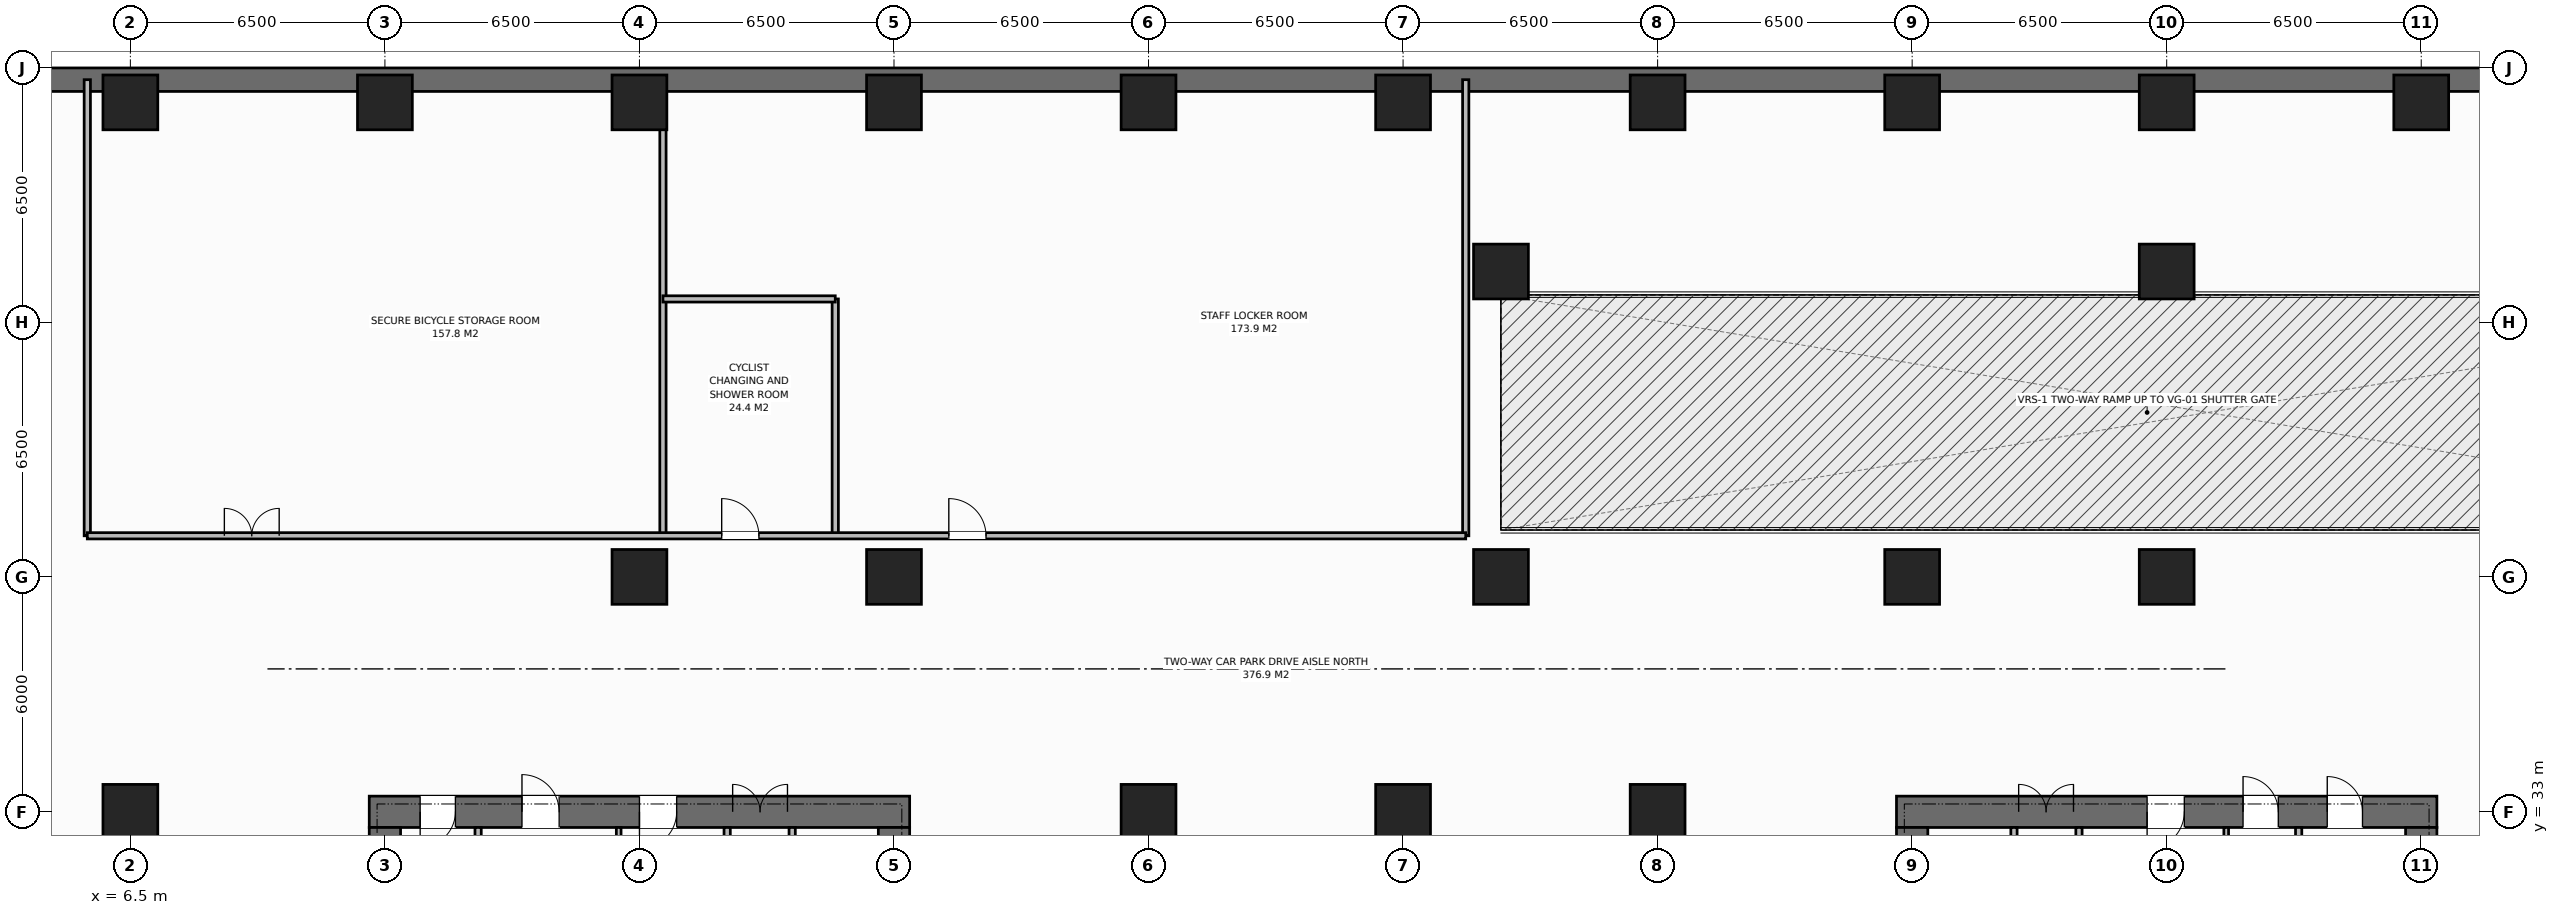
"""IFC4 building model, lengths in metres.
Left out: names, types, materials, properties, quantities, classifications, styles, units other than length and angle.
Written with IfcOpenShell. Run it as: python <this file> out.ifc"""

import sys

from ifc_helpers import new_model, si_unit, direction, frame, frame_2d, origin, origin_2d, place, context, subcontext, project, spatial, rectangle, extrude, element, fill, save


model = new_model("IFC4")
c1 = context("Model", 3, precision=1e-05, world=origin(), true_north=direction((0.0, 1.0)))
c2 = subcontext(c1, "Body", "Model", "MODEL_VIEW")
j1 = project(units=[si_unit("LENGTHUNIT", "METRE"), si_unit("PLANEANGLEUNIT", "RADIAN")], contexts=[c1])
p1 = place(None, origin())
s1 = spatial("IfcSite", under=j1, at=p1, CompositionType="ELEMENT")
p2 = place(p1, origin())
s2 = spatial("IfcBuilding", under=s1, at=p2, CompositionType="ELEMENT")
p3 = place(p2, frame((0.0, 0.0, -4.5)))
s3 = spatial("IfcBuildingStorey", under=s2, at=p3, CompositionType="ELEMENT", Elevation=-4.5)
p4 = place(p3, frame((78.2, 51.7, 0.0), z_axis=(0.0, 0.0, 1.0), x_axis=(-1.0, 0.0, 0.0)))
e1 = element("IfcWall", 1, at=p4, inside=s3, PredefinedType="USERDEFINED", context=c2, shape_type="SweptSolid", body=[
    extrude(rectangle(XDim=78.4, YDim=0.6, at=frame_2d((39.2, 0.0))), origin(), (0.0, 0.0, 1.0), 4.22),
])
p5 = place(p3, frame((12.6, 33.0, 0.0), z_axis=(0.0, 0.0, 1.0), x_axis=(1.0, 0.0, 0.0)))
e2 = element("IfcWall", 2, at=p5, inside=s3, PredefinedType="SHEAR", context=c2, shape_type="SweptSolid", body=[
    extrude(rectangle(XDim=13.8, YDim=0.8, at=frame_2d((6.9, 0.0))), origin(), (0.0, 0.0, 1.0), 4.5),
])
p6 = place(p5, frame((1.3, 0.0, 0.0)))
e3 = element("IfcOpeningElement", 3, at=p6, cuts=e2, PredefinedType="OPENING", context=c2, shape_type="SweptSolid", body=[
    extrude(rectangle(XDim=0.9, YDim=2.15, at=frame_2d((0.45, 1.075))), frame((0.0, 0.41, 0.0), z_axis=(0.0, -1.0, 0.0), x_axis=(1.0, 0.0, 0.0)), (0.0, 0.0, 1.0), 0.82),
])
p7 = place(p5, frame((3.9, 0.0, 0.0)))
e4 = element("IfcOpeningElement", 4, at=p7, cuts=e2, PredefinedType="OPENING", context=c2, shape_type="SweptSolid", body=[
    extrude(rectangle(XDim=0.95, YDim=2.15, at=frame_2d((0.475, 1.075))), frame((0.0, 0.41, 0.0), z_axis=(0.0, -1.0, 0.0), x_axis=(1.0, 0.0, 0.0)), (0.0, 0.0, 1.0), 0.82),
])
p8 = place(p5, frame((6.9, 0.0, 0.0)))
e5 = element("IfcOpeningElement", 5, at=p8, cuts=e2, PredefinedType="OPENING", context=c2, shape_type="SweptSolid", body=[
    extrude(rectangle(XDim=0.95, YDim=2.15, at=frame_2d((0.475, 1.075))), frame((0.0, 0.41, 0.0), z_axis=(0.0, -1.0, 0.0), x_axis=(1.0, 0.0, 0.0)), (0.0, 0.0, 1.0), 0.82),
])
p9 = place(p5, frame((9.28, 0.0, 0.0)))
e6 = element("IfcOpeningElement", 6, at=p9, cuts=e2, PredefinedType="OPENING", context=c2, shape_type="SweptSolid", body=[
    extrude(rectangle(XDim=1.4, YDim=2.2, at=frame_2d((0.7, 1.1))), frame((0.0, 0.41, 0.0), z_axis=(0.0, -1.0, 0.0), x_axis=(1.0, 0.0, 0.0)), (0.0, 0.0, 1.0), 0.82),
])
p10 = place(p3, frame((13.0, 19.4, 0.0), z_axis=(0.0, 0.0, 1.0), x_axis=(0.0, 1.0, 0.0)))
e7 = element("IfcWall", 7, at=p10, inside=s3, PredefinedType="SHEAR", context=c2, shape_type="SweptSolid", body=[
    extrude(rectangle(XDim=13.2, YDim=0.8, at=frame_2d((6.6, 0.0))), origin(), (0.0, 0.0, 1.0), 4.5),
])
p11 = place(p10, frame((4.65, 0.0, 0.0)))
e8 = element("IfcOpeningElement", 8, at=p11, cuts=e7, PredefinedType="OPENING", context=c2, shape_type="SweptSolid", body=[
    extrude(rectangle(XDim=1.4, YDim=2.2, at=frame_2d((0.7, 1.1))), frame((0.0, 0.41, 0.0), z_axis=(0.0, -1.0, 0.0), x_axis=(1.0, 0.0, 0.0)), (0.0, 0.0, 1.0), 0.82),
])
p12 = place(p3, frame((26.0, 19.4, 0.0), z_axis=(0.0, 0.0, 1.0), x_axis=(0.0, 1.0, 0.0)))
e9 = element("IfcWall", 9, at=p12, inside=s3, PredefinedType="SHEAR", context=c2, shape_type="SweptSolid", body=[
    extrude(rectangle(XDim=13.2, YDim=0.8, at=frame_2d((6.6, 0.0))), origin(), (0.0, 0.0, 1.0), 4.5),
])
p13 = place(p3, frame((51.6, 33.0, 0.0), z_axis=(0.0, 0.0, 1.0), x_axis=(1.0, 0.0, 0.0)))
e10 = element("IfcWall", 10, at=p13, inside=s3, PredefinedType="SHEAR", context=c2, shape_type="SweptSolid", body=[
    extrude(rectangle(XDim=13.8, YDim=0.8, at=frame_2d((6.9, 0.0))), origin(), (0.0, 0.0, 1.0), 4.5),
])
p14 = place(p13, frame((3.12, 0.0, 0.0)))
e11 = element("IfcOpeningElement", 11, at=p14, cuts=e10, PredefinedType="OPENING", context=c2, shape_type="SweptSolid", body=[
    extrude(rectangle(XDim=1.4, YDim=2.2, at=frame_2d((0.7, 1.1))), frame((0.0, 0.41, 0.0), z_axis=(0.0, -1.0, 0.0), x_axis=(1.0, 0.0, 0.0)), (0.0, 0.0, 1.0), 0.82),
])
p15 = place(p13, frame((11.0, 0.0, 0.0)))
e12 = element("IfcOpeningElement", 12, at=p15, cuts=e10, PredefinedType="OPENING", context=c2, shape_type="SweptSolid", body=[
    extrude(rectangle(XDim=0.9, YDim=2.15, at=frame_2d((0.45, 1.075))), frame((0.0, 0.41, 0.0), z_axis=(0.0, -1.0, 0.0), x_axis=(1.0, 0.0, 0.0)), (0.0, 0.0, 1.0), 0.82),
])
p16 = place(p13, frame((6.4, 0.0, 0.0)))
e13 = element("IfcOpeningElement", 13, at=p16, cuts=e10, PredefinedType="OPENING", context=c2, shape_type="SweptSolid", body=[
    extrude(rectangle(XDim=0.95, YDim=2.15, at=frame_2d((0.475, 1.075))), frame((0.0, 0.41, 0.0), z_axis=(0.0, -1.0, 0.0), x_axis=(1.0, 0.0, 0.0)), (0.0, 0.0, 1.0), 0.82),
])
p17 = place(p13, frame((8.85, 0.0, 0.0)))
e14 = element("IfcOpeningElement", 14, at=p17, cuts=e10, PredefinedType="OPENING", context=c2, shape_type="SweptSolid", body=[
    extrude(rectangle(XDim=0.9, YDim=2.15, at=frame_2d((0.45, 1.075))), frame((0.0, 0.41, 0.0), z_axis=(0.0, -1.0, 0.0), x_axis=(1.0, 0.0, 0.0)), (0.0, 0.0, 1.0), 0.82),
])
p18 = place(p3, frame((52.0, 19.4, 0.0), z_axis=(0.0, 0.0, 1.0), x_axis=(0.0, 1.0, 0.0)))
e15 = element("IfcWall", 15, at=p18, inside=s3, PredefinedType="SHEAR", context=c2, shape_type="SweptSolid", body=[
    extrude(rectangle(XDim=13.2, YDim=0.8, at=frame_2d((6.6, 0.0))), origin(), (0.0, 0.0, 1.0), 4.5),
])
p19 = place(p3, frame((65.0, 19.4, 0.0), z_axis=(0.0, 0.0, 1.0), x_axis=(0.0, 1.0, 0.0)))
e16 = element("IfcWall", 16, at=p19, inside=s3, PredefinedType="SHEAR", context=c2, shape_type="SweptSolid", body=[
    extrude(rectangle(XDim=13.2, YDim=0.8, at=frame_2d((6.6, 0.0))), origin(), (0.0, 0.0, 1.0), 4.5),
])
p20 = place(p19, frame((8.05, 0.0, 0.0)))
e17 = element("IfcOpeningElement", 17, at=p20, cuts=e16, PredefinedType="OPENING", context=c2, shape_type="SweptSolid", body=[
    extrude(rectangle(XDim=1.3, YDim=2.2, at=frame_2d((0.65, 1.1))), frame((0.0, 0.41, 0.0), z_axis=(0.0, -1.0, 0.0), x_axis=(1.0, 0.0, 0.0)), (0.0, 0.0, 1.0), 0.82),
])
for number, where, z_axis, x_axis in (
    (18, (19.5, 39.0, 0.0), (0.0, 0.0, 1.0), (1.0, 0.0, 0.0)),
    (19, (58.5, 39.0, 0.0), (0.0, 0.0, 1.0), (1.0, 0.0, 0.0)),
    (20, (6.5, 33.0, 0.0), (0.0, 0.0, 1.0), (1.0, 0.0, 0.0)),
    (21, (32.5, 33.0, 0.0), (0.0, 0.0, 1.0), (1.0, 0.0, 0.0)),
    (22, (39.0, 33.0, 0.0), (0.0, 0.0, 1.0), (1.0, 0.0, 0.0)),
    (23, (45.5, 33.0, 0.0), (0.0, 0.0, 1.0), (1.0, 0.0, 0.0)),
    (24, (41.5, 39.0, 0.0), (0.0, 0.0, 1.0), (1.0, 0.0, 0.0)),
    (25, (41.5, 46.8, 0.0), (0.0, 0.0, 1.0), (1.0, 0.0, 0.0)),
    (26, (58.5, 46.8, 0.0), (0.0, 0.0, 1.0), (1.0, 0.0, 0.0)),
    (27, (26.0, 39.0, 0.0), (0.0, 0.0, 1.0), (1.0, 0.0, 0.0)),
    (28, (52.0, 39.0, 0.0), (0.0, 0.0, 1.0), (1.0, 0.0, 0.0)),
    (29, (6.5, 51.12, 0.0), (0.0, 0.0, 1.0), (1.0, 0.0, 0.0)),
    (30, (13.0, 51.12, 0.0), (0.0, 0.0, 1.0), (1.0, 0.0, 0.0)),
    (31, (19.5, 51.12, 0.0), (0.0, 0.0, 1.0), (1.0, 0.0, 0.0)),
    (32, (26.0, 51.12, 0.0), (0.0, 0.0, 1.0), (1.0, 0.0, 0.0)),
    (33, (32.5, 51.12, 0.0), (0.0, 0.0, 1.0), (1.0, 0.0, 0.0)),
    (34, (39.0, 51.12, 0.0), (0.0, 0.0, 1.0), (1.0, 0.0, 0.0)),
    (35, (45.5, 51.12, 0.0), (0.0, 0.0, 1.0), (1.0, 0.0, 0.0)),
    (36, (52.0, 51.12, 0.0), (0.0, 0.0, 1.0), (1.0, 0.0, 0.0)),
    (37, (58.5, 51.12, 0.0), (0.0, 0.0, 1.0), (1.0, 0.0, 0.0)),
    (38, (65.0, 51.12, 0.0), (0.0, 0.0, 1.0), (1.0, 0.0, 0.0)),
):
    element("IfcColumn", number, at=place(p3, frame(where, z_axis=z_axis, x_axis=x_axis)), inside=s3, PredefinedType="COLUMN", context=c2, shape_type="SweptSolid", body=[
        extrude(rectangle(XDim=1.4, YDim=1.4, at=origin_2d()), origin(), (0.0, 0.0, 1.0), 4.5),
    ])
p21 = place(p3, frame((15.38, 26.56, 0.0), z_axis=(0.0, 0.0, 1.0), x_axis=(0.0, 1.0, 0.0)))
e39 = element("IfcWall", 39, at=p21, inside=s3, PredefinedType="STANDARD", context=c2, shape_type="SweptSolid", body=[
    extrude(rectangle(XDim=6.04, YDim=0.16, at=frame_2d((3.02, 0.0))), origin(), (0.0, 0.0, 1.0), 4.22),
])
p22 = place(p3, frame((18.97, 26.56, 0.0), z_axis=(0.0, 0.0, 1.0), x_axis=(0.0, 1.0, 0.0)))
e40 = element("IfcWall", 40, at=p22, inside=s3, PredefinedType="PARTITIONING", context=c2, shape_type="SweptSolid", body=[
    extrude(rectangle(XDim=6.04, YDim=0.12, at=frame_2d((3.02, 0.0))), origin(), (0.0, 0.0, 1.0), 4.22),
])
p23 = place(p3, frame((21.74, 26.56, 0.0), z_axis=(0.0, 0.0, 1.0), x_axis=(0.0, 1.0, 0.0)))
e41 = element("IfcWall", 41, at=p23, inside=s3, PredefinedType="STANDARD", context=c2, shape_type="SweptSolid", body=[
    extrude(rectangle(XDim=6.04, YDim=0.16, at=frame_2d((3.02, 0.0))), origin(), (0.0, 0.0, 1.0), 4.22),
])
p24 = place(p3, frame((23.4, 19.4, 0.0), z_axis=(0.0, 0.0, 1.0), x_axis=(0.0, 1.0, 0.0)))
e42 = element("IfcWall", 42, at=p24, inside=s3, PredefinedType="STANDARD", context=c2, shape_type="SweptSolid", body=[
    extrude(rectangle(XDim=13.2, YDim=0.16, at=frame_2d((6.6, 0.0))), origin(), (0.0, 0.0, 1.0), 4.22),
])
p25 = place(p24, frame((1.2, 0.0, 0.0)))
e43 = element("IfcOpeningElement", 43, at=p25, cuts=e42, PredefinedType="OPENING", context=c2, shape_type="SweptSolid", body=[
    extrude(rectangle(XDim=0.95, YDim=2.15, at=frame_2d((0.475, 1.075))), frame((0.0, 0.09, 0.0), z_axis=(0.0, -1.0, 0.0), x_axis=(1.0, 0.0, 0.0)), (0.0, 0.0, 1.0), 0.18),
])
p26 = place(p3, frame((54.6, 19.4, 0.0), z_axis=(0.0, 0.0, 1.0), x_axis=(0.0, 1.0, 0.0)))
e44 = element("IfcWall", 44, at=p26, inside=s3, PredefinedType="STANDARD", context=c2, shape_type="SweptSolid", body=[
    extrude(rectangle(XDim=13.2, YDim=0.16, at=frame_2d((6.6, 0.0))), origin(), (0.0, 0.0, 1.0), 4.22),
])
p27 = place(p26, frame((1.2, 0.0, 0.0)))
e45 = element("IfcOpeningElement", 45, at=p27, cuts=e44, PredefinedType="OPENING", context=c2, shape_type="SweptSolid", body=[
    extrude(rectangle(XDim=0.95, YDim=2.15, at=frame_2d((0.475, 1.075))), frame((0.0, 0.09, 0.0), z_axis=(0.0, -1.0, 0.0), x_axis=(1.0, 0.0, 0.0)), (0.0, 0.0, 1.0), 0.18),
])
p28 = place(p3, frame((56.26, 23.09, 0.0), z_axis=(0.0, 0.0, 1.0), x_axis=(0.0, 1.0, 0.0)))
e46 = element("IfcWall", 46, at=p28, inside=s3, PredefinedType="STANDARD", context=c2, shape_type="SweptSolid", body=[
    extrude(rectangle(XDim=9.51, YDim=0.16, at=frame_2d((4.755, 0.0))), origin(), (0.0, 0.0, 1.0), 4.22),
])
p29 = place(p28, frame((1.01, 0.0, 0.0)))
e47 = element("IfcOpeningElement", 47, at=p29, cuts=e46, PredefinedType="OPENING", context=c2, shape_type="SweptSolid", body=[
    extrude(rectangle(XDim=1.3, YDim=2.2, at=frame_2d((0.65, 1.1))), frame((0.0, 0.09, 0.0), z_axis=(0.0, -1.0, 0.0), x_axis=(1.0, 0.0, 0.0)), (0.0, 0.0, 1.0), 0.18),
])
p30 = place(p3, frame((61.87, 26.56, 0.0), z_axis=(0.0, 0.0, 1.0), x_axis=(0.0, 1.0, 0.0)))
e48 = element("IfcWall", 48, at=p30, inside=s3, PredefinedType="STANDARD", context=c2, shape_type="SweptSolid", body=[
    extrude(rectangle(XDim=6.04, YDim=0.16, at=frame_2d((3.02, 0.0))), origin(), (0.0, 0.0, 1.0), 4.22),
])
p31 = place(p3, frame((60.02, 26.56, 0.0), z_axis=(0.0, 0.0, 1.0), x_axis=(0.0, 1.0, 0.0)))
e49 = element("IfcWall", 49, at=p31, inside=s3, PredefinedType="PARTITIONING", context=c2, shape_type="SweptSolid", body=[
    extrude(rectangle(XDim=6.04, YDim=0.12, at=frame_2d((3.02, 0.0))), origin(), (0.0, 0.0, 1.0), 4.22),
])
for number, where, z_axis, x_axis in (
    (50, (5.4, 40.05, 0.0), (0.0, 0.0, 1.0), (0.0, 1.0, 0.0)),
    (51, (20.1, 40.05, 0.0), (0.0, 0.0, 1.0), (0.0, 1.0, 0.0)),
):
    element("IfcWall", number, at=place(p3, frame(where, z_axis=z_axis, x_axis=x_axis)), inside=s3, PredefinedType="STANDARD", context=c2, shape_type="SweptSolid", body=[
        extrude(rectangle(XDim=11.65, YDim=0.16, at=frame_2d((5.825, 0.0))), origin(), (0.0, 0.0, 1.0), 4.22),
    ])
p32 = place(p3, frame((24.5, 40.05, 0.0), z_axis=(0.0, 0.0, 1.0), x_axis=(0.0, 1.0, 0.0)))
e52 = element("IfcWall", 52, at=p32, inside=s3, PredefinedType="STANDARD", context=c2, shape_type="SweptSolid", body=[
    extrude(rectangle(XDim=6.05, YDim=0.16, at=frame_2d((3.025, 0.0))), origin(), (0.0, 0.0, 1.0), 4.22),
])
p33 = place(p3, frame((20.1, 46.1, 0.0), z_axis=(0.0, 0.0, 1.0), x_axis=(1.0, 0.0, 0.0)))
e53 = element("IfcWall", 53, at=p33, inside=s3, PredefinedType="STANDARD", context=c2, shape_type="SweptSolid", body=[
    extrude(rectangle(XDim=4.4, YDim=0.16, at=frame_2d((2.2, 0.0))), origin(), (0.0, 0.0, 1.0), 4.22),
])
p34 = place(p3, frame((40.6, 40.05, 0.0), z_axis=(0.0, 0.0, 1.0), x_axis=(0.0, 1.0, 0.0)))
e54 = element("IfcWall", 54, at=p34, inside=s3, PredefinedType="STANDARD", context=c2, shape_type="SweptSolid", body=[
    extrude(rectangle(XDim=11.65, YDim=0.16, at=frame_2d((5.825, 0.0))), origin(), (0.0, 0.0, 1.0), 4.22),
])
p35 = place(p3, frame((5.4, 40.05, 0.0), z_axis=(0.0, 0.0, 1.0), x_axis=(1.0, 0.0, 0.0)))
e55 = element("IfcWall", 55, at=p35, inside=s3, PredefinedType="STANDARD", context=c2, shape_type="SweptSolid", body=[
    extrude(rectangle(XDim=35.2, YDim=0.16, at=frame_2d((17.6, 0.0))), origin(), (0.0, 0.0, 1.0), 4.22),
])
p36 = place(p35, frame((3.5, 0.0, 0.0)))
e56 = element("IfcOpeningElement", 56, at=p36, cuts=e55, PredefinedType="OPENING", context=c2, shape_type="SweptSolid", body=[
    extrude(rectangle(XDim=1.4, YDim=2.2, at=frame_2d((0.7, 1.1))), frame((0.0, 0.09, 0.0), z_axis=(0.0, -1.0, 0.0), x_axis=(1.0, 0.0, 0.0)), (0.0, 0.0, 1.0), 0.18),
])
p37 = place(p35, frame((16.2, 0.0, 0.0)))
e57 = element("IfcOpeningElement", 57, at=p37, cuts=e55, PredefinedType="OPENING", context=c2, shape_type="SweptSolid", body=[
    extrude(rectangle(XDim=0.95, YDim=2.15, at=frame_2d((0.475, 1.075))), frame((0.0, 0.09, 0.0), z_axis=(0.0, -1.0, 0.0), x_axis=(1.0, 0.0, 0.0)), (0.0, 0.0, 1.0), 0.18),
])
p38 = place(p35, frame((22.0, 0.0, 0.0)))
e58 = element("IfcOpeningElement", 58, at=p38, cuts=e55, PredefinedType="OPENING", context=c2, shape_type="SweptSolid", body=[
    extrude(rectangle(XDim=0.95, YDim=2.15, at=frame_2d((0.475, 1.075))), frame((0.0, 0.09, 0.0), z_axis=(0.0, -1.0, 0.0), x_axis=(1.0, 0.0, 0.0)), (0.0, 0.0, 1.0), 0.18),
])
p39 = place(p6, origin())
e59 = element("IfcDoor", 59, at=p39, inside=s3, OperationType="SINGLE_SWING_RIGHT", PredefinedType="DOOR", context=c2, shape_type="SweptSolid", body=[
    extrude(rectangle(XDim=0.9, YDim=2.15, at=frame_2d((0.45, 1.075))), frame((0.0, -0.075, 0.0), z_axis=(0.0, -1.0, 0.0), x_axis=(1.0, 0.0, 0.0)), (0.0, 0.0, 1.0), 0.05),
])
fill(e3, e59)
p40 = place(p7, origin())
e60 = element("IfcDoor", 60, at=p40, inside=s3, OperationType="SINGLE_SWING_LEFT", PredefinedType="DOOR", context=c2, shape_type="SweptSolid", body=[
    extrude(rectangle(XDim=0.95, YDim=2.15, at=frame_2d((0.475, 1.075))), frame((0.0, -0.075, 0.0), z_axis=(0.0, -1.0, 0.0), x_axis=(1.0, 0.0, 0.0)), (0.0, 0.0, 1.0), 0.05),
])
fill(e4, e60)
p41 = place(p8, origin())
e61 = element("IfcDoor", 61, at=p41, inside=s3, OperationType="SINGLE_SWING_RIGHT", PredefinedType="DOOR", context=c2, shape_type="SweptSolid", body=[
    extrude(rectangle(XDim=0.95, YDim=2.15, at=frame_2d((0.475, 1.075))), frame((0.0, -0.075, 0.0), z_axis=(0.0, -1.0, 0.0), x_axis=(1.0, 0.0, 0.0)), (0.0, 0.0, 1.0), 0.05),
])
fill(e5, e61)
p42 = place(p9, origin())
e62 = element("IfcDoor", 62, at=p42, inside=s3, OperationType="DOUBLE_DOOR_SINGLE_SWING", PredefinedType="DOOR", context=c2, shape_type="SweptSolid", body=[
    extrude(rectangle(XDim=1.4, YDim=2.2, at=frame_2d((0.7, 1.1))), frame((0.0, -0.075, 0.0), z_axis=(0.0, -1.0, 0.0), x_axis=(1.0, 0.0, 0.0)), (0.0, 0.0, 1.0), 0.05),
])
fill(e6, e62)
p43 = place(p14, origin())
e63 = element("IfcDoor", 63, at=p43, inside=s3, OperationType="DOUBLE_DOOR_SINGLE_SWING", PredefinedType="DOOR", context=c2, shape_type="SweptSolid", body=[
    extrude(rectangle(XDim=1.4, YDim=2.2, at=frame_2d((0.7, 1.1))), frame((0.0, -0.075, 0.0), z_axis=(0.0, -1.0, 0.0), x_axis=(1.0, 0.0, 0.0)), (0.0, 0.0, 1.0), 0.05),
])
fill(e11, e63)
p44 = place(p15, origin())
e64 = element("IfcDoor", 64, at=p44, inside=s3, OperationType="SINGLE_SWING_LEFT", PredefinedType="DOOR", context=c2, shape_type="SweptSolid", body=[
    extrude(rectangle(XDim=0.9, YDim=2.15, at=frame_2d((0.45, 1.075))), frame((0.0, -0.075, 0.0), z_axis=(0.0, -1.0, 0.0), x_axis=(1.0, 0.0, 0.0)), (0.0, 0.0, 1.0), 0.05),
])
fill(e12, e64)
p45 = place(p16, origin())
e65 = element("IfcDoor", 65, at=p45, inside=s3, OperationType="SINGLE_SWING_RIGHT", PredefinedType="DOOR", context=c2, shape_type="SweptSolid", body=[
    extrude(rectangle(XDim=0.95, YDim=2.15, at=frame_2d((0.475, 1.075))), frame((0.0, -0.075, 0.0), z_axis=(0.0, -1.0, 0.0), x_axis=(1.0, 0.0, 0.0)), (0.0, 0.0, 1.0), 0.05),
])
fill(e13, e65)
p46 = place(p17, origin())
e66 = element("IfcDoor", 66, at=p46, inside=s3, OperationType="SINGLE_SWING_LEFT", PredefinedType="DOOR", context=c2, shape_type="SweptSolid", body=[
    extrude(rectangle(XDim=0.9, YDim=2.15, at=frame_2d((0.45, 1.075))), frame((0.0, -0.075, 0.0), z_axis=(0.0, -1.0, 0.0), x_axis=(1.0, 0.0, 0.0)), (0.0, 0.0, 1.0), 0.05),
])
fill(e14, e66)
p47 = place(p36, origin())
e67 = element("IfcDoor", 67, at=p47, inside=s3, OperationType="DOUBLE_DOOR_SINGLE_SWING", PredefinedType="DOOR", context=c2, shape_type="SweptSolid", body=[
    extrude(rectangle(XDim=1.4, YDim=2.2, at=frame_2d((0.7, 1.1))), frame((0.0, 0.025, 0.0), z_axis=(0.0, -1.0, 0.0), x_axis=(1.0, 0.0, 0.0)), (0.0, 0.0, 1.0), 0.05),
])
fill(e56, e67)
p48 = place(p37, origin())
e68 = element("IfcDoor", 68, at=p48, inside=s3, OperationType="SINGLE_SWING_LEFT", PredefinedType="DOOR", context=c2, shape_type="SweptSolid", body=[
    extrude(rectangle(XDim=0.95, YDim=2.15, at=frame_2d((0.475, 1.075))), frame((0.0, 0.025, 0.0), z_axis=(0.0, -1.0, 0.0), x_axis=(1.0, 0.0, 0.0)), (0.0, 0.0, 1.0), 0.05),
])
fill(e57, e68)
p49 = place(p38, origin())
e69 = element("IfcDoor", 69, at=p49, inside=s3, OperationType="SINGLE_SWING_LEFT", PredefinedType="DOOR", context=c2, shape_type="SweptSolid", body=[
    extrude(rectangle(XDim=0.95, YDim=2.15, at=frame_2d((0.475, 1.075))), frame((0.0, 0.025, 0.0), z_axis=(0.0, -1.0, 0.0), x_axis=(1.0, 0.0, 0.0)), (0.0, 0.0, 1.0), 0.05),
])
fill(e58, e69)
save(model, sys.argv[1])
